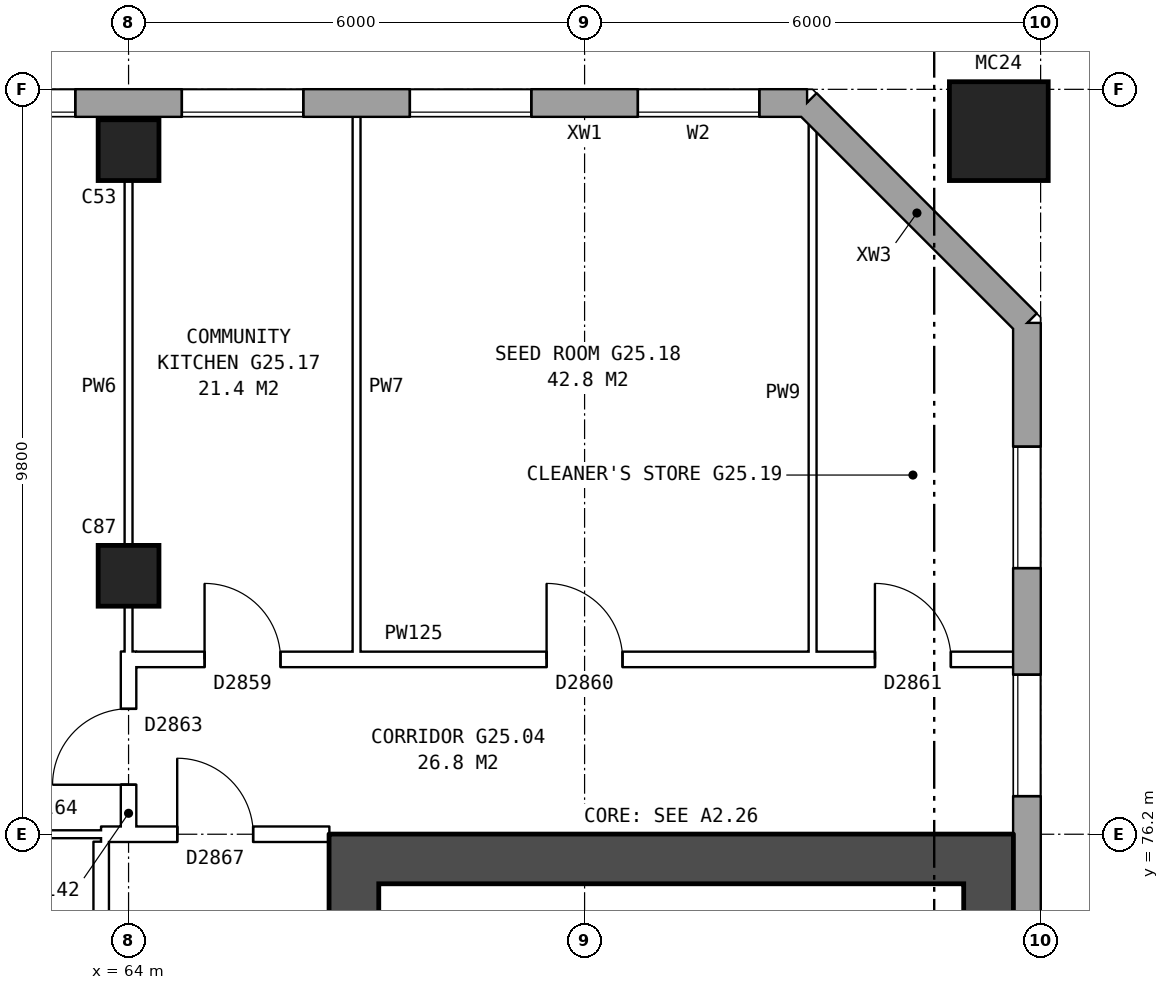
"""IFC4 building model, lengths in metres.
Left out: names, types, materials, properties, quantities, classifications, styles, units other than length and angle.
Written with IfcOpenShell. Run it as: python <this file> out.ifc"""

import sys

from ifc_helpers import new_model, si_unit, direction, frame, frame_2d, origin, origin_2d, place, context, subcontext, project, spatial, rectangle, hollow_rectangle, extrude, element, fill, save


model = new_model("IFC4")
c1 = context("Model", 3, precision=1e-05, world=origin(), true_north=direction((0.0, 1.0)))
c2 = subcontext(c1, "Body", "Model", "MODEL_VIEW")
j1 = project(units=[si_unit("LENGTHUNIT", "METRE"), si_unit("PLANEANGLEUNIT", "RADIAN")], contexts=[c1])
p1 = place(None, origin())
s1 = spatial("IfcSite", under=j1, at=p1, CompositionType="ELEMENT")
p2 = place(p1, origin())
s2 = spatial("IfcBuilding", under=s1, at=p2, CompositionType="ELEMENT")
p3 = place(p2, frame((0.0, 0.0, 90.2)))
s3 = spatial("IfcBuildingStorey", under=s2, at=p3, CompositionType="ELEMENT", Elevation=90.2)
for number, where, z_axis, x_axis in (
    (1, (64.0, 79.6, 0.0), (0.0, 0.0, 1.0), (1.0, 0.0, 0.0)),
    (2, (64.0, 85.2, 0.0), (0.0, 0.0, 1.0), (1.0, 0.0, 0.0)),
):
    element("IfcColumn", number, at=place(p3, frame(where, z_axis=z_axis, x_axis=x_axis)), inside=s3, PredefinedType="COLUMN", context=c2, shape_type="SweptSolid", body=[
        extrude(rectangle(XDim=0.8, YDim=0.8, at=origin_2d()), origin(), (0.0, 0.0, 1.0), 5.6),
    ])
p4 = place(p3, frame((75.45, 85.45, 0.0), z_axis=(0.0, 0.0, 1.0), x_axis=(1.0, 0.0, 0.0)))
e3 = element("IfcColumn", 3, at=p4, inside=s3, PredefinedType="COLUMN", context=c2, shape_type="SweptSolid", body=[
    extrude(hollow_rectangle(XDim=1.3, YDim=1.3, WallThickness=0.07, at=origin_2d()), origin(), (0.0, 0.0, 1.0), 6.2),
])
p5 = place(p3, frame((75.82, 57.075, 0.0), z_axis=(0.0, 0.0, 1.0), x_axis=(0.0, 1.0, 0.0)))
e4 = element("IfcWall", 4, at=p5, inside=s3, PredefinedType="STANDARD", context=c2, shape_type="SweptSolid", body=[
    extrude(rectangle(XDim=25.851, YDim=0.36, at=frame_2d((12.925, 0.0))), origin(), (0.0, 0.0, 1.0), 5.6),
])
p6 = place(p5, frame((1.625, 0.0, 0.15)))
e5 = element("IfcOpeningElement", 5, at=p6, cuts=e4, PredefinedType="OPENING", context=c2, shape_type="SweptSolid", body=[
    extrude(rectangle(XDim=1.6, YDim=2.4, at=frame_2d((0.8, 1.2))), frame((0.0, 0.19, 0.0), z_axis=(0.0, -1.0, 0.0), x_axis=(1.0, 0.0, 0.0)), (0.0, 0.0, 1.0), 0.38),
])
p7 = place(p5, frame((4.625, 0.0, 0.15)))
e6 = element("IfcOpeningElement", 6, at=p7, cuts=e4, PredefinedType="OPENING", context=c2, shape_type="SweptSolid", body=[
    extrude(rectangle(XDim=1.6, YDim=2.4, at=frame_2d((0.8, 1.2))), frame((0.0, 0.19, 0.0), z_axis=(0.0, -1.0, 0.0), x_axis=(1.0, 0.0, 0.0)), (0.0, 0.0, 1.0), 0.38),
])
p8 = place(p5, frame((19.625, 0.0, 0.15)))
e7 = element("IfcOpeningElement", 7, at=p8, cuts=e4, PredefinedType="OPENING", context=c2, shape_type="SweptSolid", body=[
    extrude(rectangle(XDim=1.6, YDim=2.4, at=frame_2d((0.8, 1.2))), frame((0.0, 0.19, 0.0), z_axis=(0.0, -1.0, 0.0), x_axis=(1.0, 0.0, 0.0)), (0.0, 0.0, 1.0), 0.38),
])
p9 = place(p5, frame((22.625, 0.0, 0.15)))
e8 = element("IfcOpeningElement", 8, at=p9, cuts=e4, PredefinedType="OPENING", context=c2, shape_type="SweptSolid", body=[
    extrude(rectangle(XDim=1.6, YDim=2.4, at=frame_2d((0.8, 1.2))), frame((0.0, 0.19, 0.0), z_axis=(0.0, -1.0, 0.0), x_axis=(1.0, 0.0, 0.0)), (0.0, 0.0, 1.0), 0.38),
])
p10 = place(p3, frame((75.82, 82.925, 0.0), z_axis=(0.0, 0.0, 1.0), x_axis=(-0.707106781187, 0.707106781187, 0.0)))
e9 = element("IfcWall", 9, at=p10, inside=s3, PredefinedType="STANDARD", context=c2, shape_type="SweptSolid", body=[
    extrude(rectangle(XDim=4.094, YDim=0.36, at=frame_2d((2.047, 0.0))), origin(), (0.0, 0.0, 1.0), 5.6),
])
p11 = place(p3, frame((72.925, 85.82, 0.0), z_axis=(0.0, 0.0, 1.0), x_axis=(-1.0, 0.0, 0.0)))
e10 = element("IfcWall", 10, at=p11, inside=s3, PredefinedType="STANDARD", context=c2, shape_type="SweptSolid", body=[
    extrude(rectangle(XDim=44.851, YDim=0.36, at=frame_2d((22.425, 0.0))), origin(), (0.0, 0.0, 1.0), 5.6),
])
p12 = place(p11, frame((0.625, 0.0, 0.15)))
e11 = element("IfcOpeningElement", 11, at=p12, cuts=e10, PredefinedType="OPENING", context=c2, shape_type="SweptSolid", body=[
    extrude(rectangle(XDim=1.6, YDim=2.4, at=frame_2d((0.8, 1.2))), frame((0.0, 0.19, 0.0), z_axis=(0.0, -1.0, 0.0), x_axis=(1.0, 0.0, 0.0)), (0.0, 0.0, 1.0), 0.38),
])
p13 = place(p11, frame((3.625, 0.0, 0.15)))
e12 = element("IfcOpeningElement", 12, at=p13, cuts=e10, PredefinedType="OPENING", context=c2, shape_type="SweptSolid", body=[
    extrude(rectangle(XDim=1.6, YDim=2.4, at=frame_2d((0.8, 1.2))), frame((0.0, 0.19, 0.0), z_axis=(0.0, -1.0, 0.0), x_axis=(1.0, 0.0, 0.0)), (0.0, 0.0, 1.0), 0.38),
])
p14 = place(p11, frame((6.625, 0.0, 0.15)))
e13 = element("IfcOpeningElement", 13, at=p14, cuts=e10, PredefinedType="OPENING", context=c2, shape_type="SweptSolid", body=[
    extrude(rectangle(XDim=1.6, YDim=2.4, at=frame_2d((0.8, 1.2))), frame((0.0, 0.19, 0.0), z_axis=(0.0, -1.0, 0.0), x_axis=(1.0, 0.0, 0.0)), (0.0, 0.0, 1.0), 0.38),
])
p15 = place(p11, frame((9.625, 0.0, 0.15)))
e14 = element("IfcOpeningElement", 14, at=p15, cuts=e10, PredefinedType="OPENING", context=c2, shape_type="SweptSolid", body=[
    extrude(rectangle(XDim=1.6, YDim=2.4, at=frame_2d((0.8, 1.2))), frame((0.0, 0.19, 0.0), z_axis=(0.0, -1.0, 0.0), x_axis=(1.0, 0.0, 0.0)), (0.0, 0.0, 1.0), 0.38),
])
p16 = place(p11, frame((12.625, 0.0, 0.15)))
e15 = element("IfcOpeningElement", 15, at=p16, cuts=e10, PredefinedType="OPENING", context=c2, shape_type="SweptSolid", body=[
    extrude(rectangle(XDim=1.6, YDim=2.4, at=frame_2d((0.8, 1.2))), frame((0.0, 0.19, 0.0), z_axis=(0.0, -1.0, 0.0), x_axis=(1.0, 0.0, 0.0)), (0.0, 0.0, 1.0), 0.38),
])
p17 = place(p11, frame((15.625, 0.0, 0.15)))
e16 = element("IfcOpeningElement", 16, at=p17, cuts=e10, PredefinedType="OPENING", context=c2, shape_type="SweptSolid", body=[
    extrude(rectangle(XDim=1.6, YDim=2.4, at=frame_2d((0.8, 1.2))), frame((0.0, 0.19, 0.0), z_axis=(0.0, -1.0, 0.0), x_axis=(1.0, 0.0, 0.0)), (0.0, 0.0, 1.0), 0.38),
])
p18 = place(p11, frame((18.625, 0.0, 0.15)))
e17 = element("IfcOpeningElement", 17, at=p18, cuts=e10, PredefinedType="OPENING", context=c2, shape_type="SweptSolid", body=[
    extrude(rectangle(XDim=1.6, YDim=2.4, at=frame_2d((0.8, 1.2))), frame((0.0, 0.19, 0.0), z_axis=(0.0, -1.0, 0.0), x_axis=(1.0, 0.0, 0.0)), (0.0, 0.0, 1.0), 0.38),
])
p19 = place(p11, frame((21.625, 0.0, 0.15)))
e18 = element("IfcOpeningElement", 18, at=p19, cuts=e10, PredefinedType="OPENING", context=c2, shape_type="SweptSolid", body=[
    extrude(rectangle(XDim=1.6, YDim=2.4, at=frame_2d((0.8, 1.2))), frame((0.0, 0.19, 0.0), z_axis=(0.0, -1.0, 0.0), x_axis=(1.0, 0.0, 0.0)), (0.0, 0.0, 1.0), 0.38),
])
p20 = place(p11, frame((24.625, 0.0, 0.15)))
e19 = element("IfcOpeningElement", 19, at=p20, cuts=e10, PredefinedType="OPENING", context=c2, shape_type="SweptSolid", body=[
    extrude(rectangle(XDim=1.6, YDim=2.4, at=frame_2d((0.8, 1.2))), frame((0.0, 0.19, 0.0), z_axis=(0.0, -1.0, 0.0), x_axis=(1.0, 0.0, 0.0)), (0.0, 0.0, 1.0), 0.38),
])
p21 = place(p11, frame((27.625, 0.0, 0.15)))
e20 = element("IfcOpeningElement", 20, at=p21, cuts=e10, PredefinedType="OPENING", context=c2, shape_type="SweptSolid", body=[
    extrude(rectangle(XDim=1.6, YDim=2.4, at=frame_2d((0.8, 1.2))), frame((0.0, 0.19, 0.0), z_axis=(0.0, -1.0, 0.0), x_axis=(1.0, 0.0, 0.0)), (0.0, 0.0, 1.0), 0.38),
])
p22 = place(p11, frame((30.625, 0.0, 0.15)))
e21 = element("IfcOpeningElement", 21, at=p22, cuts=e10, PredefinedType="OPENING", context=c2, shape_type="SweptSolid", body=[
    extrude(rectangle(XDim=1.6, YDim=2.4, at=frame_2d((0.8, 1.2))), frame((0.0, 0.19, 0.0), z_axis=(0.0, -1.0, 0.0), x_axis=(1.0, 0.0, 0.0)), (0.0, 0.0, 1.0), 0.38),
])
p23 = place(p11, frame((33.625, 0.0, 0.15)))
e22 = element("IfcOpeningElement", 22, at=p23, cuts=e10, PredefinedType="OPENING", context=c2, shape_type="SweptSolid", body=[
    extrude(rectangle(XDim=1.6, YDim=2.4, at=frame_2d((0.8, 1.2))), frame((0.0, 0.19, 0.0), z_axis=(0.0, -1.0, 0.0), x_axis=(1.0, 0.0, 0.0)), (0.0, 0.0, 1.0), 0.38),
])
p24 = place(p11, frame((36.625, 0.0, 0.15)))
e23 = element("IfcOpeningElement", 23, at=p24, cuts=e10, PredefinedType="OPENING", context=c2, shape_type="SweptSolid", body=[
    extrude(rectangle(XDim=1.6, YDim=2.4, at=frame_2d((0.8, 1.2))), frame((0.0, 0.19, 0.0), z_axis=(0.0, -1.0, 0.0), x_axis=(1.0, 0.0, 0.0)), (0.0, 0.0, 1.0), 0.38),
])
p25 = place(p11, frame((39.625, 0.0, 0.15)))
e24 = element("IfcOpeningElement", 24, at=p25, cuts=e10, PredefinedType="OPENING", context=c2, shape_type="SweptSolid", body=[
    extrude(rectangle(XDim=1.6, YDim=2.4, at=frame_2d((0.8, 1.2))), frame((0.0, 0.19, 0.0), z_axis=(0.0, -1.0, 0.0), x_axis=(1.0, 0.0, 0.0)), (0.0, 0.0, 1.0), 0.38),
])
p26 = place(p11, frame((42.625, 0.0, 0.15)))
e25 = element("IfcOpeningElement", 25, at=p26, cuts=e10, PredefinedType="OPENING", context=c2, shape_type="SweptSolid", body=[
    extrude(rectangle(XDim=1.6, YDim=2.4, at=frame_2d((0.8, 1.2))), frame((0.0, 0.19, 0.0), z_axis=(0.0, -1.0, 0.0), x_axis=(1.0, 0.0, 0.0)), (0.0, 0.0, 1.0), 0.38),
])
p27 = place(p3, frame((66.965, 64.45, 0.0), z_axis=(0.0, 0.0, 1.0), x_axis=(0.0, 1.0, 0.0)))
e26 = element("IfcWall", 26, at=p27, inside=s3, PredefinedType="SHEAR", context=c2, shape_type="SweptSolid", body=[
    extrude(rectangle(XDim=11.1, YDim=0.65, at=frame_2d((5.55, 0.0))), origin(), (0.0, 0.0, 1.0), 5.6),
])
p28 = place(p27, frame((0.675, 0.0, 0.0)))
e27 = element("IfcOpeningElement", 27, at=p28, cuts=e26, PredefinedType="OPENING", context=c2, shape_type="SweptSolid", body=[
    extrude(rectangle(XDim=1.1, YDim=2.1, at=frame_2d((0.55, 1.05))), frame((0.0, 0.335, 0.0), z_axis=(0.0, -1.0, 0.0), x_axis=(1.0, 0.0, 0.0)), (0.0, 0.0, 1.0), 0.67),
])
p29 = place(p27, frame((9.25, 0.0, 0.0)))
e28 = element("IfcOpeningElement", 28, at=p29, cuts=e26, PredefinedType="OPENING", context=c2, shape_type="SweptSolid", body=[
    extrude(rectangle(XDim=1.1, YDim=2.1, at=frame_2d((0.55, 1.05))), frame((0.0, 0.335, 0.0), z_axis=(0.0, -1.0, 0.0), x_axis=(1.0, 0.0, 0.0)), (0.0, 0.0, 1.0), 0.67),
])
p30 = place(p3, frame((75.315, 64.45, 0.0), z_axis=(0.0, 0.0, 1.0), x_axis=(0.0, 1.0, 0.0)))
e29 = element("IfcWall", 29, at=p30, inside=s3, PredefinedType="SHEAR", context=c2, shape_type="SweptSolid", body=[
    extrude(rectangle(XDim=11.1, YDim=0.65, at=frame_2d((5.55, 0.0))), origin(), (0.0, 0.0, 1.0), 5.6),
])
p31 = place(p3, frame((66.64, 75.875, 0.0), z_axis=(0.0, 0.0, 1.0), x_axis=(1.0, 0.0, 0.0)))
e30 = element("IfcWall", 30, at=p31, inside=s3, PredefinedType="SHEAR", context=c2, shape_type="SweptSolid", body=[
    extrude(rectangle(XDim=9.0, YDim=0.65, at=frame_2d((4.5, 0.0))), origin(), (0.0, 0.0, 1.0), 5.6),
])
p32 = place(p3, frame((63.64, 63.9, 0.0), z_axis=(0.0, 0.0, 1.0), x_axis=(0.0, 1.0, 0.0)))
e31 = element("IfcWall", 31, at=p32, inside=s3, PredefinedType="PARTITIONING", context=c2, shape_type="SweptSolid", body=[
    extrude(rectangle(XDim=12.2, YDim=0.2, at=frame_2d((6.1, 0.0))), origin(), (0.0, 0.0, 1.0), 5.6),
])
p33 = place(p32, frame((5.1, 0.0, 0.0)))
e32 = element("IfcOpeningElement", 32, at=p33, cuts=e31, PredefinedType="OPENING", context=c2, shape_type="SweptSolid", body=[
    extrude(rectangle(XDim=2.0, YDim=2.1, at=frame_2d((1.0, 1.05))), frame((0.0, 0.11, 0.0), z_axis=(0.0, -1.0, 0.0), x_axis=(1.0, 0.0, 0.0)), (0.0, 0.0, 1.0), 0.22),
])
p34 = place(p3, frame((63.64, 76.2, 0.0), z_axis=(0.0, 0.0, 1.0), x_axis=(1.0, 0.0, 0.0)))
e33 = element("IfcWall", 33, at=p34, inside=s3, PredefinedType="PARTITIONING", context=c2, shape_type="SweptSolid", body=[
    extrude(rectangle(XDim=3.0, YDim=0.2, at=frame_2d((1.5, 0.0))), origin(), (0.0, 0.0, 1.0), 5.6),
])
p35 = place(p34, frame((1.0, 0.0, 0.0)))
e34 = element("IfcOpeningElement", 34, at=p35, cuts=e33, PredefinedType="OPENING", context=c2, shape_type="SweptSolid", body=[
    extrude(rectangle(XDim=1.0, YDim=2.1, at=frame_2d((0.5, 1.05))), frame((0.0, 0.11, 0.0), z_axis=(0.0, -1.0, 0.0), x_axis=(1.0, 0.0, 0.0)), (0.0, 0.0, 1.0), 0.22),
])
p36 = place(p3, frame((44.26, 76.2, 0.0), z_axis=(0.0, 0.0, 1.0), x_axis=(1.0, 0.0, 0.0)))
e35 = element("IfcWall", 35, at=p36, inside=s3, PredefinedType="PARTITIONING", context=c2, shape_type="SweptSolid", body=[
    extrude(rectangle(XDim=19.38, YDim=0.1, at=frame_2d((9.69, 0.0))), origin(), (0.0, 0.0, 1.0), 5.6),
])
p37 = place(p36, frame((4.42, 0.0, 0.0)))
e36 = element("IfcOpeningElement", 36, at=p37, cuts=e35, PredefinedType="OPENING", context=c2, shape_type="SweptSolid", body=[
    extrude(rectangle(XDim=1.0, YDim=2.1, at=frame_2d((0.5, 1.05))), frame((0.0, 0.06, 0.0), z_axis=(0.0, -1.0, 0.0), x_axis=(1.0, 0.0, 0.0)), (0.0, 0.0, 1.0), 0.12),
])
p38 = place(p36, frame((14.06, 0.0, 0.0)))
e37 = element("IfcOpeningElement", 37, at=p38, cuts=e35, PredefinedType="OPENING", context=c2, shape_type="SweptSolid", body=[
    extrude(rectangle(XDim=1.0, YDim=2.1, at=frame_2d((0.5, 1.05))), frame((0.0, 0.06, 0.0), z_axis=(0.0, -1.0, 0.0), x_axis=(1.0, 0.0, 0.0)), (0.0, 0.0, 1.0), 0.12),
])
p39 = place(p3, frame((63.9, 78.5, 0.0), z_axis=(0.0, 0.0, 1.0), x_axis=(1.0, 0.0, 0.0)))
e38 = element("IfcWall", 38, at=p39, inside=s3, PredefinedType="PARTITIONING", context=c2, shape_type="SweptSolid", body=[
    extrude(rectangle(XDim=11.86, YDim=0.2, at=frame_2d((5.93, 0.0))), origin(), (0.0, 0.0, 1.0), 5.6),
])
p40 = place(p39, frame((1.1, 0.0, 0.0)))
e39 = element("IfcOpeningElement", 39, at=p40, cuts=e38, PredefinedType="OPENING", context=c2, shape_type="SweptSolid", body=[
    extrude(rectangle(XDim=1.0, YDim=2.1, at=frame_2d((0.5, 1.05))), frame((0.0, 0.11, 0.0), z_axis=(0.0, -1.0, 0.0), x_axis=(1.0, 0.0, 0.0)), (0.0, 0.0, 1.0), 0.22),
])
p41 = place(p39, frame((5.6, 0.0, 0.0)))
e40 = element("IfcOpeningElement", 40, at=p41, cuts=e38, PredefinedType="OPENING", context=c2, shape_type="SweptSolid", body=[
    extrude(rectangle(XDim=1.0, YDim=2.1, at=frame_2d((0.5, 1.05))), frame((0.0, 0.11, 0.0), z_axis=(0.0, -1.0, 0.0), x_axis=(1.0, 0.0, 0.0)), (0.0, 0.0, 1.0), 0.22),
])
p42 = place(p39, frame((9.92, 0.0, 0.0)))
e41 = element("IfcOpeningElement", 41, at=p42, cuts=e38, PredefinedType="OPENING", context=c2, shape_type="SweptSolid", body=[
    extrude(rectangle(XDim=1.0, YDim=2.1, at=frame_2d((0.5, 1.05))), frame((0.0, 0.11, 0.0), z_axis=(0.0, -1.0, 0.0), x_axis=(1.0, 0.0, 0.0)), (0.0, 0.0, 1.0), 0.22),
])
p43 = place(p3, frame((64.0, 76.1, 0.0), z_axis=(0.0, 0.0, 1.0), x_axis=(0.0, 1.0, 0.0)))
e42 = element("IfcWall", 42, at=p43, inside=s3, PredefinedType="PARTITIONING", context=c2, shape_type="SweptSolid", body=[
    extrude(rectangle(XDim=2.502, YDim=0.2, at=frame_2d((1.251, 0.0))), origin(), (0.0, 0.0, 1.0), 5.6),
])
p44 = place(p43, frame((0.751, 0.0, 0.0)))
e43 = element("IfcOpeningElement", 43, at=p44, cuts=e42, PredefinedType="OPENING", context=c2, shape_type="SweptSolid", body=[
    extrude(rectangle(XDim=1.0, YDim=2.1, at=frame_2d((0.5, 1.05))), frame((0.0, 0.11, 0.0), z_axis=(0.0, -1.0, 0.0), x_axis=(1.0, 0.0, 0.0)), (0.0, 0.0, 1.0), 0.22),
])
p45 = place(p3, frame((64.0, 78.398, 0.0), z_axis=(0.0, 0.0, 1.0), x_axis=(0.0, 1.0, 0.0)))
e44 = element("IfcWall", 44, at=p45, inside=s3, PredefinedType="PARTITIONING", context=c2, shape_type="SweptSolid", body=[
    extrude(rectangle(XDim=7.362, YDim=0.1, at=frame_2d((3.681, 0.0))), origin(), (0.0, 0.0, 1.0), 5.6),
])
p46 = place(p3, frame((67.0, 78.4, 0.0), z_axis=(0.0, 0.0, 1.0), x_axis=(0.0, 1.0, 0.0)))
e45 = element("IfcWall", 45, at=p46, inside=s3, PredefinedType="PARTITIONING", context=c2, shape_type="SweptSolid", body=[
    extrude(rectangle(XDim=7.36, YDim=0.1, at=frame_2d((3.68, 0.0))), origin(), (0.0, 0.0, 1.0), 5.6),
])
p47 = place(p3, frame((73.0, 78.4, 0.0), z_axis=(0.0, 0.0, 1.0), x_axis=(0.0, 1.0, 0.0)))
e46 = element("IfcWall", 46, at=p47, inside=s3, PredefinedType="PARTITIONING", context=c2, shape_type="SweptSolid", body=[
    extrude(rectangle(XDim=7.211, YDim=0.1, at=frame_2d((3.605, 0.0))), origin(), (0.0, 0.0, 1.0), 5.6),
])
p48 = place(p8, origin())
e47 = element("IfcWindow", 47, at=p48, inside=s3, PartitioningType="SINGLE_PANEL", PredefinedType="WINDOW", context=c2, shape_type="SweptSolid", body=[
    extrude(rectangle(XDim=1.6, YDim=2.4, at=frame_2d((0.8, 1.2))), frame((0.0, 0.15, 0.0), z_axis=(0.0, -1.0, 0.0), x_axis=(1.0, 0.0, 0.0)), (0.0, 0.0, 1.0), 0.06),
])
fill(e7, e47)
p49 = place(p9, origin())
e48 = element("IfcWindow", 48, at=p49, inside=s3, PartitioningType="SINGLE_PANEL", PredefinedType="WINDOW", context=c2, shape_type="SweptSolid", body=[
    extrude(rectangle(XDim=1.6, YDim=2.4, at=frame_2d((0.8, 1.2))), frame((0.0, 0.15, 0.0), z_axis=(0.0, -1.0, 0.0), x_axis=(1.0, 0.0, 0.0)), (0.0, 0.0, 1.0), 0.06),
])
fill(e8, e48)
p50 = place(p12, origin())
e49 = element("IfcWindow", 49, at=p50, inside=s3, PartitioningType="SINGLE_PANEL", PredefinedType="WINDOW", context=c2, shape_type="SweptSolid", body=[
    extrude(rectangle(XDim=1.6, YDim=2.4, at=frame_2d((0.8, 1.2))), frame((0.0, 0.15, 0.0), z_axis=(0.0, -1.0, 0.0), x_axis=(1.0, 0.0, 0.0)), (0.0, 0.0, 1.0), 0.06),
])
fill(e11, e49)
p51 = place(p13, origin())
e50 = element("IfcWindow", 50, at=p51, inside=s3, PartitioningType="SINGLE_PANEL", PredefinedType="WINDOW", context=c2, shape_type="SweptSolid", body=[
    extrude(rectangle(XDim=1.6, YDim=2.4, at=frame_2d((0.8, 1.2))), frame((0.0, 0.15, 0.0), z_axis=(0.0, -1.0, 0.0), x_axis=(1.0, 0.0, 0.0)), (0.0, 0.0, 1.0), 0.06),
])
fill(e12, e50)
p52 = place(p14, origin())
e51 = element("IfcWindow", 51, at=p52, inside=s3, PartitioningType="SINGLE_PANEL", PredefinedType="WINDOW", context=c2, shape_type="SweptSolid", body=[
    extrude(rectangle(XDim=1.6, YDim=2.4, at=frame_2d((0.8, 1.2))), frame((0.0, 0.15, 0.0), z_axis=(0.0, -1.0, 0.0), x_axis=(1.0, 0.0, 0.0)), (0.0, 0.0, 1.0), 0.06),
])
fill(e13, e51)
p53 = place(p15, origin())
e52 = element("IfcWindow", 52, at=p53, inside=s3, PartitioningType="SINGLE_PANEL", PredefinedType="WINDOW", context=c2, shape_type="SweptSolid", body=[
    extrude(rectangle(XDim=1.6, YDim=2.4, at=frame_2d((0.8, 1.2))), frame((0.0, 0.15, 0.0), z_axis=(0.0, -1.0, 0.0), x_axis=(1.0, 0.0, 0.0)), (0.0, 0.0, 1.0), 0.06),
])
fill(e14, e52)
p54 = place(p35, origin())
e53 = element("IfcDoor", 53, at=p54, inside=s3, OperationType="SINGLE_SWING_LEFT", PredefinedType="DOOR", context=c2, shape_type="SweptSolid", body=[
    extrude(rectangle(XDim=1.0, YDim=2.1, at=frame_2d((0.5, 1.05))), frame((0.0, 0.025, 0.0), z_axis=(0.0, -1.0, 0.0), x_axis=(1.0, 0.0, 0.0)), (0.0, 0.0, 1.0), 0.05),
])
fill(e34, e53)
p55 = place(p40, origin())
e54 = element("IfcDoor", 54, at=p55, inside=s3, OperationType="SINGLE_SWING_LEFT", PredefinedType="DOOR", context=c2, shape_type="SweptSolid", body=[
    extrude(rectangle(XDim=1.0, YDim=2.1, at=frame_2d((0.5, 1.05))), frame((0.0, 0.025, 0.0), z_axis=(0.0, -1.0, 0.0), x_axis=(1.0, 0.0, 0.0)), (0.0, 0.0, 1.0), 0.05),
])
fill(e39, e54)
p56 = place(p41, origin())
e55 = element("IfcDoor", 55, at=p56, inside=s3, OperationType="SINGLE_SWING_LEFT", PredefinedType="DOOR", context=c2, shape_type="SweptSolid", body=[
    extrude(rectangle(XDim=1.0, YDim=2.1, at=frame_2d((0.5, 1.05))), frame((0.0, 0.025, 0.0), z_axis=(0.0, -1.0, 0.0), x_axis=(1.0, 0.0, 0.0)), (0.0, 0.0, 1.0), 0.05),
])
fill(e40, e55)
p57 = place(p42, origin())
e56 = element("IfcDoor", 56, at=p57, inside=s3, OperationType="SINGLE_SWING_LEFT", PredefinedType="DOOR", context=c2, shape_type="SweptSolid", body=[
    extrude(rectangle(XDim=1.0, YDim=2.1, at=frame_2d((0.5, 1.05))), frame((0.0, 0.025, 0.0), z_axis=(0.0, -1.0, 0.0), x_axis=(1.0, 0.0, 0.0)), (0.0, 0.0, 1.0), 0.05),
])
fill(e41, e56)
p58 = place(p44, origin())
e57 = element("IfcDoor", 57, at=p58, inside=s3, OperationType="SINGLE_SWING_LEFT", PredefinedType="DOOR", context=c2, shape_type="SweptSolid", body=[
    extrude(rectangle(XDim=1.0, YDim=2.1, at=frame_2d((0.5, 1.05))), frame((0.0, 0.025, 0.0), z_axis=(0.0, -1.0, 0.0), x_axis=(1.0, 0.0, 0.0)), (0.0, 0.0, 1.0), 0.05),
])
fill(e43, e57)
save(model, sys.argv[1])
